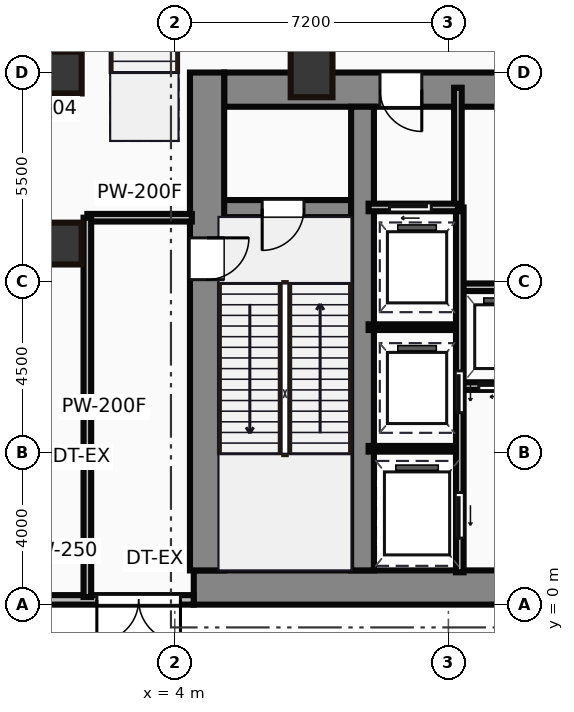
"""IFC4 building model, lengths in metres.
Left out: names, types, materials, properties, quantities, classifications, styles, units other than length and angle.
Written with IfcOpenShell. Run it as: python <this file> out.ifc"""

import sys

from ifc_helpers import new_model, si_unit, direction, frame, frame_2d, origin, origin_2d, place, context, subcontext, project, spatial, rectangle, hollow_rectangle, extrude, source, transform, mapped, element, fill, save


model = new_model("IFC4")
c1 = context("Model", 3, precision=1e-05, world=origin(), true_north=direction((0.0, 1.0)))
c2 = subcontext(c1, "Body", "Model", "MODEL_VIEW")
j1 = project(units=[si_unit("LENGTHUNIT", "METRE"), si_unit("PLANEANGLEUNIT", "RADIAN")], contexts=[c1])
p1 = place(None, origin())
s1 = spatial("IfcSite", under=j1, at=p1, CompositionType="ELEMENT")
p2 = place(p1, origin())
s2 = spatial("IfcBuilding", under=s1, at=p2, CompositionType="ELEMENT")
p3 = place(p2, origin())
s3 = spatial("IfcBuildingStorey", under=s2, at=p3, CompositionType="ELEMENT", Elevation=0.0)
m1 = source(origin(), c2, "Body", "SweptSolid", [
    extrude(rectangle(XDim=29.5, YDim=0.9, at=frame_2d((14.75, 0.0))), origin(), (0.0, 0.0, 1.0), 6.0),
])
p4 = place(p3, frame((4.5, 0.45, 0.0), z_axis=(0.0, 0.0, 1.0), x_axis=(1.0, 0.0, 0.0)))
e1 = element("IfcWall", 1, at=p4, inside=s3, PredefinedType="SHEAR", context=c2, shape_type="MappedRepresentation", body=[
    mapped(m1, transform((0.0, 0.0, 0.0))),
])
m2 = source(origin(), c2, "Body", "SweptSolid", [
    extrude(rectangle(XDim=13.1, YDim=0.9, at=frame_2d((6.55, 0.0))), origin(), (0.0, 0.0, 1.0), 6.0),
])
p5 = place(p3, frame((4.85, 0.9, 0.0), z_axis=(0.0, 0.0, 1.0), x_axis=(0.0, 1.0, 0.0)))
e2 = element("IfcWall", 2, at=p5, inside=s3, PredefinedType="SHEAR", context=c2, shape_type="MappedRepresentation", body=[
    mapped(m2, transform((0.0, 0.0, 0.0))),
])
p6 = place(p5, frame((7.65, 0.0, 0.0)))
e3 = element("IfcOpeningElement", 3, at=p6, cuts=e2, PredefinedType="OPENING", context=c2, shape_type="SweptSolid", body=[
    extrude(rectangle(XDim=1.1, YDim=2.15, at=frame_2d((0.55, 1.075))), frame((0.0, 0.46, 0.0), z_axis=(0.0, -1.0, 0.0), x_axis=(1.0, 0.0, 0.0)), (0.0, 0.0, 1.0), 0.92),
])
m3 = source(origin(), c2, "Body", "SweptSolid", [
    extrude(rectangle(XDim=9.1, YDim=0.9, at=frame_2d((4.55, 0.0))), origin(), (0.0, 0.0, 1.0), 6.0),
])
p7 = place(p3, frame((5.3, 13.55, 0.0), z_axis=(0.0, 0.0, 1.0), x_axis=(1.0, 0.0, 0.0)))
e4 = element("IfcWall", 4, at=p7, inside=s3, PredefinedType="SHEAR", context=c2, shape_type="MappedRepresentation", body=[
    mapped(m3, transform((0.0, 0.0, 0.0))),
])
p8 = place(p7, frame((4.1, 0.0, 0.0)))
e5 = element("IfcOpeningElement", 5, at=p8, cuts=e4, PredefinedType="OPENING", context=c2, shape_type="SweptSolid", body=[
    extrude(rectangle(XDim=1.1, YDim=2.15, at=frame_2d((0.55, 1.075))), frame((0.0, 0.46, 0.0), z_axis=(0.0, -1.0, 0.0), x_axis=(1.0, 0.0, 0.0)), (0.0, 0.0, 1.0), 0.92),
])
m4 = source(origin(), c2, "Body", "SweptSolid", [
    extrude(rectangle(XDim=12.2, YDim=0.6, at=frame_2d((6.1, 0.0))), origin(), (0.0, 0.0, 1.0), 6.0),
])
p9 = place(p3, frame((8.94, 0.9, 0.0), z_axis=(0.0, 0.0, 1.0), x_axis=(0.0, 1.0, 0.0)))
e6 = element("IfcWall", 6, at=p9, inside=s3, PredefinedType="SHEAR", context=c2, shape_type="MappedRepresentation", body=[
    mapped(m4, transform((0.0, 0.0, 0.0))),
])
m5 = source(origin(), c2, "Body", "SweptSolid", [
    extrude(rectangle(XDim=3.39, YDim=0.45, at=frame_2d((1.695, 0.0))), origin(), (0.0, 0.0, 1.0), 6.0),
])
p10 = place(p3, frame((5.25, 10.42, 0.0), z_axis=(0.0, 0.0, 1.0), x_axis=(1.0, 0.0, 0.0)))
e7 = element("IfcWall", 7, at=p10, inside=s3, PredefinedType="SHEAR", context=c2, shape_type="MappedRepresentation", body=[
    mapped(m5, transform((0.0, 0.0, 0.0))),
])
p11 = place(p10, frame((1.05, 0.0, 0.0)))
e8 = element("IfcOpeningElement", 8, at=p11, cuts=e7, PredefinedType="OPENING", context=c2, shape_type="SweptSolid", body=[
    extrude(rectangle(XDim=1.1, YDim=2.15, at=frame_2d((0.55, 1.075))), frame((0.0, 0.235, 0.0), z_axis=(0.0, -1.0, 0.0), x_axis=(1.0, 0.0, 0.0)), (0.0, 0.0, 1.0), 0.47),
])
m6 = source(origin(), c2, "Body", "SweptSolid", [
    extrude(hollow_rectangle(XDim=1.1, YDim=1.1, WallThickness=0.05, at=origin_2d()), origin(), (0.0, 0.0, 1.0), 6.0),
])
for number, where, z_axis, x_axis in (
    (9, (1.0, 9.5, 0.0), (0.0, 0.0, 1.0), (1.0, 0.0, 0.0)),
    (10, (1.0, 14.0, 0.0), (0.0, 0.0, 1.0), (1.0, 0.0, 0.0)),
):
    element("IfcColumn", number, at=place(p3, frame(where, z_axis=z_axis, x_axis=x_axis)), inside=s3, PredefinedType="PILASTER", context=c2, shape_type="MappedRepresentation", body=[
        mapped(m6, transform((0.0, 0.0, 0.0))),
    ])
m7 = source(origin(), c2, "Body", "SweptSolid", [
    extrude(hollow_rectangle(XDim=1.1, YDim=1.3, WallThickness=0.055, at=origin_2d()), origin(), (0.0, 0.0, 1.0), 6.0),
])
p12 = place(p3, frame((7.6, 14.0, 0.0), z_axis=(0.0, 0.0, 1.0), x_axis=(1.0, 0.0, 0.0)))
e11 = element("IfcColumn", 11, at=p12, inside=s3, PredefinedType="PILASTER", context=c2, shape_type="MappedRepresentation", body=[
    mapped(m7, transform((0.0, 0.0, 0.0))),
])
m8 = source(origin(), c2, "Body", "SweptSolid", [
    extrude(rectangle(XDim=4.5, YDim=0.25, at=frame_2d((2.25, 0.0))), origin(), (0.0, 0.0, 1.0), 5.7),
])
p13 = place(p3, frame((0.0, 0.125, 0.0), z_axis=(0.0, 0.0, 1.0), x_axis=(1.0, 0.0, 0.0)))
e12 = element("IfcWall", 12, at=p13, inside=s3, PredefinedType="STANDARD", context=c2, shape_type="MappedRepresentation", body=[
    mapped(m8, transform((0.0, 0.0, 0.0))),
])
p14 = place(p13, frame((1.95, 0.0, 0.0)))
e13 = element("IfcOpeningElement", 13, at=p14, cuts=e12, PredefinedType="OPENING", context=c2, shape_type="SweptSolid", body=[
    extrude(rectangle(XDim=2.2, YDim=2.4, at=frame_2d((1.1, 1.2))), frame((0.0, 0.135, 0.0), z_axis=(0.0, -1.0, 0.0), x_axis=(1.0, 0.0, 0.0)), (0.0, 0.0, 1.0), 0.27),
])
m9 = source(origin(), c2, "Body", "SweptSolid", [
    extrude(rectangle(XDim=3.18, YDim=0.2, at=frame_2d((1.59, 0.0))), origin(), (0.0, 0.0, 1.0), 5.7),
])
p15 = place(p3, frame((11.45, 10.42, 0.0), z_axis=(0.0, 0.0, 1.0), x_axis=(0.0, 1.0, 0.0)))
e14 = element("IfcWall", 14, at=p15, inside=s3, PredefinedType="PARTITIONING", context=c2, shape_type="MappedRepresentation", body=[
    mapped(m9, transform((0.0, 0.0, 0.0))),
])
m10 = source(origin(), c2, "Body", "SweptSolid", [
    extrude(rectangle(XDim=2.35, YDim=0.2, at=frame_2d((1.175, 0.0))), origin(), (0.0, 0.0, 1.0), 5.7),
])
p16 = place(p3, frame((9.1, 10.45, 0.0), z_axis=(0.0, 0.0, 1.0), x_axis=(1.0, 0.0, 0.0)))
e15 = element("IfcWall", 15, at=p16, inside=s3, PredefinedType="PARTITIONING", context=c2, shape_type="MappedRepresentation", body=[
    mapped(m10, transform((0.0, 0.0, 0.0))),
])
p17 = place(p16, frame((0.55, 0.0, 0.0)))
e16 = element("IfcOpeningElement", 16, at=p17, cuts=e15, PredefinedType="OPENING", context=c2, shape_type="SweptSolid", body=[
    extrude(rectangle(XDim=1.1, YDim=2.15, at=frame_2d((0.55, 1.075))), frame((0.0, 0.11, 0.0), z_axis=(0.0, -1.0, 0.0), x_axis=(1.0, 0.0, 0.0)), (0.0, 0.0, 1.0), 0.22),
])
m11 = source(origin(), c2, "Body", "SweptSolid", [
    extrude(rectangle(XDim=9.6, YDim=0.2, at=frame_2d((4.8, 0.0))), origin(), (0.0, 0.0, 1.0), 5.7),
])
p18 = place(p3, frame((11.5, 0.85, 0.0), z_axis=(0.0, 0.0, 1.0), x_axis=(0.0, 1.0, 0.0)))
e17 = element("IfcWall", 17, at=p18, inside=s3, PredefinedType="PARTITIONING", context=c2, shape_type="MappedRepresentation", body=[
    mapped(m11, transform((0.0, 0.0, 0.0))),
])
p19 = place(p18, frame((4.2, 0.0, 0.0)))
e18 = element("IfcOpeningElement", 18, at=p19, cuts=e17, PredefinedType="OPENING", context=c2, shape_type="SweptSolid", body=[
    extrude(rectangle(XDim=1.1, YDim=2.15, at=frame_2d((0.55, 1.075))), frame((0.0, 0.11, 0.0), z_axis=(0.0, -1.0, 0.0), x_axis=(1.0, 0.0, 0.0)), (0.0, 0.0, 1.0), 0.22),
])
p20 = place(p18, frame((0.9, 0.0, 0.0)))
e19 = element("IfcOpeningElement", 19, at=p20, cuts=e17, PredefinedType="OPENING", context=c2, shape_type="SweptSolid", body=[
    extrude(rectangle(XDim=1.2, YDim=2.15, at=frame_2d((0.6, 1.075))), frame((0.0, 0.11, 0.0), z_axis=(0.0, -1.0, 0.0), x_axis=(1.0, 0.0, 0.0)), (0.0, 0.0, 1.0), 0.22),
])
m12 = source(origin(), c2, "Body", "SweptSolid", [
    extrude(rectangle(XDim=2.4, YDim=0.15, at=frame_2d((1.2, 0.0))), origin(), (0.0, 0.0, 1.0), 5.7),
])
for number, where, z_axis, x_axis in (
    (20, (9.1, 4.1, 0.0), (0.0, 0.0, 1.0), (1.0, 0.0, 0.0)),
    (21, (9.1, 7.3, 0.0), (0.0, 0.0, 1.0), (1.0, 0.0, 0.0)),
):
    element("IfcWall", number, at=place(p3, frame(where, z_axis=z_axis, x_axis=x_axis)), inside=s3, PredefinedType="PARTITIONING", context=c2, shape_type="MappedRepresentation", body=[
        mapped(m12, transform((0.0, 0.0, 0.0))),
    ])
m13 = source(origin(), c2, "Body", "SweptSolid", [
    extrude(rectangle(XDim=11.85, YDim=0.2, at=frame_2d((5.925, 0.0))), origin(), (0.0, 0.0, 1.0), 5.7),
])
p21 = place(p3, frame((11.55, 5.75, 0.0), z_axis=(0.0, 0.0, 1.0), x_axis=(1.0, 0.0, 0.0)))
e22 = element("IfcWall", 22, at=p21, inside=s3, PredefinedType="PARTITIONING", context=c2, shape_type="MappedRepresentation", body=[
    mapped(m13, transform((0.0, 0.0, 0.0))),
])
p22 = place(p21, frame((0.45, 0.0, 0.0)))
e23 = element("IfcOpeningElement", 23, at=p22, cuts=e22, PredefinedType="OPENING", context=c2, shape_type="SweptSolid", body=[
    extrude(rectangle(XDim=1.05, YDim=2.15, at=frame_2d((0.525, 1.075))), frame((0.0, 0.11, 0.0), z_axis=(0.0, -1.0, 0.0), x_axis=(1.0, 0.0, 0.0)), (0.0, 0.0, 1.0), 0.22),
])
p23 = place(p21, frame((2.4, 0.0, 0.0)))
e24 = element("IfcOpeningElement", 24, at=p23, cuts=e22, PredefinedType="OPENING", context=c2, shape_type="SweptSolid", body=[
    extrude(rectangle(XDim=1.05, YDim=2.15, at=frame_2d((0.525, 1.075))), frame((0.0, 0.11, 0.0), z_axis=(0.0, -1.0, 0.0), x_axis=(1.0, 0.0, 0.0)), (0.0, 0.0, 1.0), 0.22),
])
p24 = place(p21, frame((4.35, 0.0, 0.0)))
e25 = element("IfcOpeningElement", 25, at=p24, cuts=e22, PredefinedType="OPENING", context=c2, shape_type="SweptSolid", body=[
    extrude(rectangle(XDim=1.05, YDim=2.15, at=frame_2d((0.525, 1.075))), frame((0.0, 0.11, 0.0), z_axis=(0.0, -1.0, 0.0), x_axis=(1.0, 0.0, 0.0)), (0.0, 0.0, 1.0), 0.22),
])
p25 = place(p21, frame((6.3, 0.0, 0.0)))
e26 = element("IfcOpeningElement", 26, at=p25, cuts=e22, PredefinedType="OPENING", context=c2, shape_type="SweptSolid", body=[
    extrude(rectangle(XDim=1.05, YDim=2.15, at=frame_2d((0.525, 1.075))), frame((0.0, 0.11, 0.0), z_axis=(0.0, -1.0, 0.0), x_axis=(1.0, 0.0, 0.0)), (0.0, 0.0, 1.0), 0.22),
])
p26 = place(p21, frame((8.25, 0.0, 0.0)))
e27 = element("IfcOpeningElement", 27, at=p26, cuts=e22, PredefinedType="OPENING", context=c2, shape_type="SweptSolid", body=[
    extrude(rectangle(XDim=1.05, YDim=2.15, at=frame_2d((0.525, 1.075))), frame((0.0, 0.11, 0.0), z_axis=(0.0, -1.0, 0.0), x_axis=(1.0, 0.0, 0.0)), (0.0, 0.0, 1.0), 0.22),
])
p27 = place(p21, frame((10.2, 0.0, 0.0)))
e28 = element("IfcOpeningElement", 28, at=p27, cuts=e22, PredefinedType="OPENING", context=c2, shape_type="SweptSolid", body=[
    extrude(rectangle(XDim=1.05, YDim=2.15, at=frame_2d((0.525, 1.075))), frame((0.0, 0.11, 0.0), z_axis=(0.0, -1.0, 0.0), x_axis=(1.0, 0.0, 0.0)), (0.0, 0.0, 1.0), 0.22),
])
p28 = place(p3, frame((11.55, 8.35, 0.0), z_axis=(0.0, 0.0, 1.0), x_axis=(1.0, 0.0, 0.0)))
e29 = element("IfcWall", 29, at=p28, inside=s3, PredefinedType="PARTITIONING", context=c2, shape_type="MappedRepresentation", body=[
    mapped(m13, transform((0.0, 0.0, 0.0))),
])
m14 = source(origin(), c2, "Body", "SweptSolid", [
    extrude(rectangle(XDim=9.98, YDim=0.2, at=frame_2d((4.99, 0.0))), origin(), (0.0, 0.0, 1.0), 5.7),
])
p29 = place(p3, frame((1.7, 0.2, 0.0), z_axis=(0.0, 0.0, 1.0), x_axis=(0.0, 1.0, 0.0)))
e30 = element("IfcWall", 30, at=p29, inside=s3, PredefinedType="PARTITIONING", context=c2, shape_type="MappedRepresentation", body=[
    mapped(m14, transform((0.0, 0.0, 0.0))),
])
m15 = source(origin(), c2, "Body", "SweptSolid", [
    extrude(rectangle(XDim=2.75, YDim=0.2, at=frame_2d((1.375, 0.0))), origin(), (0.0, 0.0, 1.0), 5.7),
])
p30 = place(p3, frame((1.7, 10.18, 0.0), z_axis=(0.0, 0.0, 1.0), x_axis=(1.0, 0.0, 0.0)))
e31 = element("IfcWall", 31, at=p30, inside=s3, PredefinedType="PARTITIONING", context=c2, shape_type="MappedRepresentation", body=[
    mapped(m15, transform((0.0, 0.0, 0.0))),
])
m16 = source(origin(), c2, "Body", "SweptSolid", [
    extrude(rectangle(XDim=2.2, YDim=2.4, at=frame_2d((1.1, 1.2))), frame((0.0, 0.025, 0.0), z_axis=(0.0, -1.0, 0.0), x_axis=(1.0, 0.0, 0.0)), (0.0, 0.0, 1.0), 0.05),
])
p31 = place(p14, frame((2.2, 0.0, 0.0), z_axis=(0.0, 0.0, 1.0), x_axis=(-1.0, 0.0, 0.0)))
e32 = element("IfcDoor", 32, at=p31, inside=s3, OperationType="DOUBLE_DOOR_SINGLE_SWING", PredefinedType="DOOR", context=c2, shape_type="MappedRepresentation", body=[
    mapped(m16, transform((0.0, 0.0, 0.0))),
])
fill(e13, e32)
m17 = source(origin(), c2, "Body", "SweptSolid", [
    extrude(rectangle(XDim=1.1, YDim=2.15, at=frame_2d((0.55, 1.075))), frame((0.0, 0.025, 0.0), z_axis=(0.0, -1.0, 0.0), x_axis=(1.0, 0.0, 0.0)), (0.0, 0.0, 1.0), 0.05),
])
p32 = place(p11, frame((1.1, 0.0, 0.0), z_axis=(0.0, 0.0, 1.0), x_axis=(-1.0, 0.0, 0.0)))
e33 = element("IfcDoor", 33, at=p32, inside=s3, OperationType="SINGLE_SWING_LEFT", PredefinedType="DOOR", context=c2, shape_type="MappedRepresentation", body=[
    mapped(m17, transform((0.0, 0.0, 0.0))),
])
fill(e8, e33)
p33 = place(p6, origin())
e34 = element("IfcDoor", 34, at=p33, inside=s3, OperationType="SINGLE_SWING_RIGHT", PredefinedType="DOOR", context=c2, shape_type="MappedRepresentation", body=[
    mapped(m17, transform((0.0, 0.0, 0.0))),
])
fill(e3, e34)
p34 = place(p8, origin())
e35 = element("IfcDoor", 35, at=p34, inside=s3, OperationType="SINGLE_SWING_RIGHT", PredefinedType="DOOR", context=c2, shape_type="MappedRepresentation", body=[
    mapped(m17, transform((0.0, 0.0, 0.0))),
])
fill(e5, e35)
p35 = place(p17, origin())
e36 = element("IfcDoor", 36, at=p35, inside=s3, OperationType="SLIDING_TO_LEFT", PredefinedType="DOOR", context=c2, shape_type="MappedRepresentation", body=[
    mapped(m17, transform((0.0, 0.0, 0.0))),
])
fill(e16, e36)
p36 = place(p19, frame((1.1, 0.0, 0.0), z_axis=(0.0, 0.0, 1.0), x_axis=(-1.0, 0.0, 0.0)))
e37 = element("IfcDoor", 37, at=p36, inside=s3, OperationType="SLIDING_TO_LEFT", PredefinedType="DOOR", context=c2, shape_type="MappedRepresentation", body=[
    mapped(m17, transform((0.0, 0.0, 0.0))),
])
fill(e18, e37)
m18 = source(origin(), c2, "Body", "SweptSolid", [
    extrude(rectangle(XDim=1.2, YDim=2.15, at=frame_2d((0.6, 1.075))), frame((0.0, 0.025, 0.0), z_axis=(0.0, -1.0, 0.0), x_axis=(1.0, 0.0, 0.0)), (0.0, 0.0, 1.0), 0.05),
])
p37 = place(p20, frame((1.2, 0.0, 0.0), z_axis=(0.0, 0.0, 1.0), x_axis=(-1.0, 0.0, 0.0)))
e38 = element("IfcDoor", 38, at=p37, inside=s3, OperationType="SLIDING_TO_LEFT", PredefinedType="DOOR", context=c2, shape_type="MappedRepresentation", body=[
    mapped(m18, transform((0.0, 0.0, 0.0))),
])
fill(e19, e38)
m19 = source(origin(), c2, "Body", "SweptSolid", [
    extrude(rectangle(XDim=1.05, YDim=2.15, at=frame_2d((0.525, 1.075))), frame((0.0, 0.025, 0.0), z_axis=(0.0, -1.0, 0.0), x_axis=(1.0, 0.0, 0.0)), (0.0, 0.0, 1.0), 0.05),
])
p38 = place(p22, frame((1.05, 0.0, 0.0), z_axis=(0.0, 0.0, 1.0), x_axis=(-1.0, 0.0, 0.0)))
e39 = element("IfcDoor", 39, at=p38, inside=s3, OperationType="SLIDING_TO_LEFT", PredefinedType="DOOR", context=c2, shape_type="MappedRepresentation", body=[
    mapped(m19, transform((0.0, 0.0, 0.0))),
])
fill(e23, e39)
save(model, sys.argv[1])
